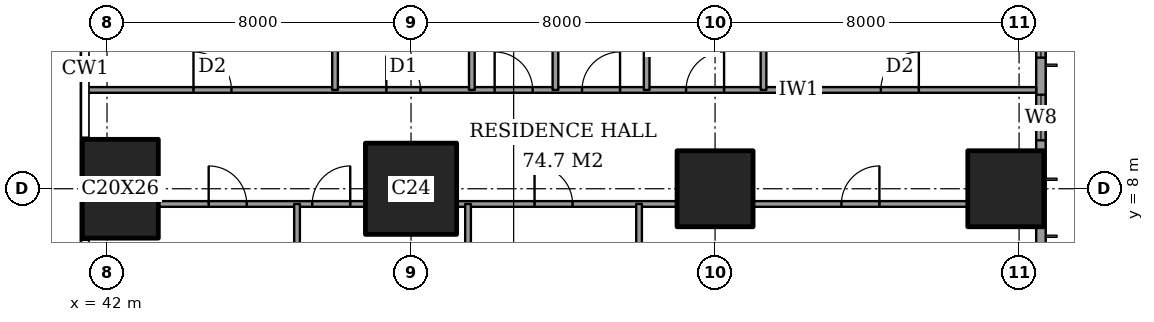
"""IFC4 building model, lengths in metres.
Left out: names, types, materials, properties, quantities, classifications, styles, units other than length and angle.
Written with IfcOpenShell. Run it as: python <this file> out.ifc"""

import sys

from ifc_helpers import new_model, si_unit, direction, frame, frame_2d, origin, origin_2d, place, context, subcontext, project, spatial, rectangle, extrude, element, fill, save


model = new_model("IFC4")
c1 = context("Model", 3, precision=1e-05, world=origin(), true_north=direction((0.0, 1.0)))
c2 = subcontext(c1, "Body", "Model", "MODEL_VIEW")
j1 = project(units=[si_unit("LENGTHUNIT", "METRE"), si_unit("PLANEANGLEUNIT", "RADIAN")], contexts=[c1])
p1 = place(None, origin())
s1 = spatial("IfcSite", under=j1, at=p1, CompositionType="ELEMENT")
p2 = place(p1, origin())
s2 = spatial("IfcBuilding", under=s1, at=p2, CompositionType="ELEMENT")
p3 = place(p2, frame((0.0, 0.0, 36.8)))
s3 = spatial("IfcBuildingStorey", under=s2, at=p3, CompositionType="ELEMENT", Elevation=36.8)
p4 = place(p3, frame((42.35, 8.0, 0.0), z_axis=(0.0, 0.0, 1.0), x_axis=(1.0, 0.0, 0.0)))
e1 = element("IfcColumn", 1, at=p4, inside=s3, PredefinedType="COLUMN", context=c2, shape_type="SweptSolid", body=[
    extrude(rectangle(XDim=2.0, YDim=2.6, at=origin_2d()), origin(), (0.0, 0.0, 1.0), 3.6),
])
p5 = place(p3, frame((50.0, 8.0, 0.0), z_axis=(0.0, 0.0, 1.0), x_axis=(1.0, 0.0, 0.0)))
e2 = element("IfcColumn", 2, at=p5, inside=s3, PredefinedType="COLUMN", context=c2, shape_type="SweptSolid", body=[
    extrude(rectangle(XDim=2.4, YDim=2.4, at=origin_2d()), origin(), (0.0, 0.0, 1.0), 3.6),
])
for number, where, z_axis, x_axis in (
    (3, (58.0, 8.0, 0.0), (0.0, 0.0, 1.0), (1.0, 0.0, 0.0)),
    (4, (65.65, 8.0, 0.0), (0.0, 0.0, 1.0), (1.0, 0.0, 0.0)),
):
    element("IfcColumn", number, at=place(p3, frame(where, z_axis=z_axis, x_axis=x_axis)), inside=s3, PredefinedType="COLUMN", context=c2, shape_type="SweptSolid", body=[
        extrude(rectangle(XDim=2.0, YDim=2.0, at=origin_2d()), origin(), (0.0, 0.0, 1.0), 3.6),
    ])
p6 = place(p3, frame((66.575, 3.175, 0.0), z_axis=(0.0, 0.0, 1.0), x_axis=(0.0, 1.0, 0.0)))
e5 = element("IfcWall", 5, at=p6, inside=s3, PredefinedType="SOLIDWALL", context=c2, shape_type="SweptSolid", body=[
    extrude(rectangle(XDim=41.65, YDim=0.25, at=frame_2d((20.825, 0.0))), origin(), (0.0, 0.0, 1.0), 3.6),
])
p7 = place(p6, frame((0.775, 0.0, 0.6)))
e6 = element("IfcOpeningElement", 6, at=p7, cuts=e5, PredefinedType="OPENING", context=c2, shape_type="SweptSolid", body=[
    extrude(rectangle(XDim=2.4, YDim=2.0, at=frame_2d((1.2, 1.0))), frame((0.0, 0.135, 0.0), z_axis=(0.0, -1.0, 0.0), x_axis=(1.0, 0.0, 0.0)), (0.0, 0.0, 1.0), 0.27),
])
p8 = place(p6, frame((6.1, 0.0, 0.6)))
e7 = element("IfcOpeningElement", 7, at=p8, cuts=e5, PredefinedType="OPENING", context=c2, shape_type="SweptSolid", body=[
    extrude(rectangle(XDim=1.2, YDim=2.0, at=frame_2d((0.6, 1.0))), frame((0.0, 0.135, 0.0), z_axis=(0.0, -1.0, 0.0), x_axis=(1.0, 0.0, 0.0)), (0.0, 0.0, 1.0), 0.27),
])
p9 = place(p6, frame((8.275, 0.0, 0.6)))
e8 = element("IfcOpeningElement", 8, at=p9, cuts=e5, PredefinedType="OPENING", context=c2, shape_type="SweptSolid", body=[
    extrude(rectangle(XDim=2.4, YDim=2.0, at=frame_2d((1.2, 1.0))), frame((0.0, 0.135, 0.0), z_axis=(0.0, -1.0, 0.0), x_axis=(1.0, 0.0, 0.0)), (0.0, 0.0, 1.0), 0.27),
])
p10 = place(p6, frame((15.775, 0.0, 0.6)))
e9 = element("IfcOpeningElement", 9, at=p10, cuts=e5, PredefinedType="OPENING", context=c2, shape_type="SweptSolid", body=[
    extrude(rectangle(XDim=2.4, YDim=2.0, at=frame_2d((1.2, 1.0))), frame((0.0, 0.135, 0.0), z_axis=(0.0, -1.0, 0.0), x_axis=(1.0, 0.0, 0.0)), (0.0, 0.0, 1.0), 0.27),
])
p11 = place(p6, frame((23.475, 0.0, 0.6)))
e10 = element("IfcOpeningElement", 10, at=p11, cuts=e5, PredefinedType="OPENING", context=c2, shape_type="SweptSolid", body=[
    extrude(rectangle(XDim=2.4, YDim=2.0, at=frame_2d((1.2, 1.0))), frame((0.0, 0.135, 0.0), z_axis=(0.0, -1.0, 0.0), x_axis=(1.0, 0.0, 0.0)), (0.0, 0.0, 1.0), 0.27),
])
p12 = place(p6, frame((30.975, 0.0, 0.6)))
e11 = element("IfcOpeningElement", 11, at=p12, cuts=e5, PredefinedType="OPENING", context=c2, shape_type="SweptSolid", body=[
    extrude(rectangle(XDim=2.4, YDim=2.0, at=frame_2d((1.2, 1.0))), frame((0.0, 0.135, 0.0), z_axis=(0.0, -1.0, 0.0), x_axis=(1.0, 0.0, 0.0)), (0.0, 0.0, 1.0), 0.27),
])
p13 = place(p6, frame((34.5, 0.0, 0.6)))
e12 = element("IfcOpeningElement", 12, at=p13, cuts=e5, PredefinedType="OPENING", context=c2, shape_type="SweptSolid", body=[
    extrude(rectangle(XDim=1.2, YDim=2.0, at=frame_2d((0.6, 1.0))), frame((0.0, 0.135, 0.0), z_axis=(0.0, -1.0, 0.0), x_axis=(1.0, 0.0, 0.0)), (0.0, 0.0, 1.0), 0.27),
])
p14 = place(p6, frame((38.475, 0.0, 0.6)))
e13 = element("IfcOpeningElement", 13, at=p14, cuts=e5, PredefinedType="OPENING", context=c2, shape_type="SweptSolid", body=[
    extrude(rectangle(XDim=2.4, YDim=2.0, at=frame_2d((1.2, 1.0))), frame((0.0, 0.135, 0.0), z_axis=(0.0, -1.0, 0.0), x_axis=(1.0, 0.0, 0.0)), (0.0, 0.0, 1.0), 0.27),
])
p15 = place(p3, frame((43.35, 7.6, 0.0), z_axis=(0.0, 0.0, 1.0), x_axis=(1.0, 0.0, 0.0)))
e14 = element("IfcWall", 14, at=p15, inside=s3, PredefinedType="PARTITIONING", context=c2, shape_type="SweptSolid", body=[
    extrude(rectangle(XDim=5.45, YDim=0.15, at=frame_2d((2.725, 0.0))), origin(), (0.0, 0.0, 1.0), 3.35),
])
p16 = place(p15, frame((4.05, 0.0, 0.0)))
e15 = element("IfcOpeningElement", 15, at=p16, cuts=e14, PredefinedType="OPENING", context=c2, shape_type="SweptSolid", body=[
    extrude(rectangle(XDim=1.0, YDim=2.1, at=frame_2d((0.5, 1.05))), frame((0.0, 0.085, 0.0), z_axis=(0.0, -1.0, 0.0), x_axis=(1.0, 0.0, 0.0)), (0.0, 0.0, 1.0), 0.17),
])
p17 = place(p15, frame((1.325, 0.0, 0.0)))
e16 = element("IfcOpeningElement", 16, at=p17, cuts=e14, PredefinedType="OPENING", context=c2, shape_type="SweptSolid", body=[
    extrude(rectangle(XDim=1.0, YDim=2.1, at=frame_2d((0.5, 1.05))), frame((0.0, 0.085, 0.0), z_axis=(0.0, -1.0, 0.0), x_axis=(1.0, 0.0, 0.0)), (0.0, 0.0, 1.0), 0.17),
])
p18 = place(p3, frame((51.2, 7.6, 0.0), z_axis=(0.0, 0.0, 1.0), x_axis=(1.0, 0.0, 0.0)))
e17 = element("IfcWall", 17, at=p18, inside=s3, PredefinedType="PARTITIONING", context=c2, shape_type="SweptSolid", body=[
    extrude(rectangle(XDim=5.8, YDim=0.15, at=frame_2d((2.9, 0.0))), origin(), (0.0, 0.0, 1.0), 3.35),
])
p19 = place(p18, frame((2.05, 0.0, 0.0)))
e18 = element("IfcOpeningElement", 18, at=p19, cuts=e17, PredefinedType="OPENING", context=c2, shape_type="SweptSolid", body=[
    extrude(rectangle(XDim=1.0, YDim=2.1, at=frame_2d((0.5, 1.05))), frame((0.0, 0.085, 0.0), z_axis=(0.0, -1.0, 0.0), x_axis=(1.0, 0.0, 0.0)), (0.0, 0.0, 1.0), 0.17),
])
p20 = place(p3, frame((59.0, 7.6, 0.0), z_axis=(0.0, 0.0, 1.0), x_axis=(1.0, 0.0, 0.0)))
e19 = element("IfcWall", 19, at=p20, inside=s3, PredefinedType="PARTITIONING", context=c2, shape_type="SweptSolid", body=[
    extrude(rectangle(XDim=5.65, YDim=0.15, at=frame_2d((2.825, 0.0))), origin(), (0.0, 0.0, 1.0), 3.35),
])
p21 = place(p20, frame((2.325, 0.0, 0.0)))
e20 = element("IfcOpeningElement", 20, at=p21, cuts=e19, PredefinedType="OPENING", context=c2, shape_type="SweptSolid", body=[
    extrude(rectangle(XDim=1.0, YDim=2.1, at=frame_2d((0.5, 1.05))), frame((0.0, 0.085, 0.0), z_axis=(0.0, -1.0, 0.0), x_axis=(1.0, 0.0, 0.0)), (0.0, 0.0, 1.0), 0.17),
])
p22 = place(p3, frame((41.439, 10.6, 0.0), z_axis=(0.0, 0.0, 1.0), x_axis=(1.0, 0.0, 0.0)))
e21 = element("IfcWall", 21, at=p22, inside=s3, PredefinedType="PARTITIONING", context=c2, shape_type="SweptSolid", body=[
    extrude(rectangle(XDim=25.011, YDim=0.15, at=frame_2d((12.505, 0.0))), origin(), (0.0, 0.0, 1.0), 3.35),
])
p23 = place(p22, frame((10.761, 0.0, 0.0)))
e22 = element("IfcOpeningElement", 22, at=p23, cuts=e21, PredefinedType="OPENING", context=c2, shape_type="SweptSolid", body=[
    extrude(rectangle(XDim=1.0, YDim=2.1, at=frame_2d((0.5, 1.05))), frame((0.0, 0.085, 0.0), z_axis=(0.0, -1.0, 0.0), x_axis=(1.0, 0.0, 0.0)), (0.0, 0.0, 1.0), 0.17),
])
p24 = place(p22, frame((20.924, 0.0, 0.0)))
e23 = element("IfcOpeningElement", 23, at=p24, cuts=e21, PredefinedType="OPENING", context=c2, shape_type="SweptSolid", body=[
    extrude(rectangle(XDim=1.0, YDim=2.1, at=frame_2d((0.5, 1.05))), frame((0.0, 0.085, 0.0), z_axis=(0.0, -1.0, 0.0), x_axis=(1.0, 0.0, 0.0)), (0.0, 0.0, 1.0), 0.17),
])
p25 = place(p22, frame((15.799, 0.0, 0.0)))
e24 = element("IfcOpeningElement", 24, at=p25, cuts=e21, PredefinedType="OPENING", context=c2, shape_type="SweptSolid", body=[
    extrude(rectangle(XDim=1.0, YDim=2.1, at=frame_2d((0.5, 1.05))), frame((0.0, 0.085, 0.0), z_axis=(0.0, -1.0, 0.0), x_axis=(1.0, 0.0, 0.0)), (0.0, 0.0, 1.0), 0.17),
])
p26 = place(p22, frame((13.061, 0.0, 0.0)))
e25 = element("IfcOpeningElement", 25, at=p26, cuts=e21, PredefinedType="OPENING", context=c2, shape_type="SweptSolid", body=[
    extrude(rectangle(XDim=1.0, YDim=2.1, at=frame_2d((0.5, 1.05))), frame((0.0, 0.085, 0.0), z_axis=(0.0, -1.0, 0.0), x_axis=(1.0, 0.0, 0.0)), (0.0, 0.0, 1.0), 0.17),
])
p27 = place(p22, frame((7.911, 0.0, 0.0)))
e26 = element("IfcOpeningElement", 26, at=p27, cuts=e21, PredefinedType="OPENING", context=c2, shape_type="SweptSolid", body=[
    extrude(rectangle(XDim=0.9, YDim=2.1, at=frame_2d((0.45, 1.05))), frame((0.0, 0.085, 0.0), z_axis=(0.0, -1.0, 0.0), x_axis=(1.0, 0.0, 0.0)), (0.0, 0.0, 1.0), 0.17),
])
p28 = place(p22, frame((2.836, 0.0, 0.0)))
e27 = element("IfcOpeningElement", 27, at=p28, cuts=e21, PredefinedType="OPENING", context=c2, shape_type="SweptSolid", body=[
    extrude(rectangle(XDim=1.0, YDim=2.1, at=frame_2d((0.5, 1.05))), frame((0.0, 0.085, 0.0), z_axis=(0.0, -1.0, 0.0), x_axis=(1.0, 0.0, 0.0)), (0.0, 0.0, 1.0), 0.17),
])
p29 = place(p3, frame((47.0, -0.45, 0.0), z_axis=(0.0, 0.0, 1.0), x_axis=(0.0, 1.0, 0.0)))
e28 = element("IfcWall", 28, at=p29, inside=s3, PredefinedType="PARTITIONING", context=c2, shape_type="SweptSolid", body=[
    extrude(rectangle(XDim=8.05, YDim=0.15, at=frame_2d((4.025, 0.0))), origin(), (0.0, 0.0, 1.0), 3.35),
])
p30 = place(p3, frame((48.0, 10.6, 0.0), z_axis=(0.0, 0.0, 1.0), x_axis=(0.0, 1.0, 0.0)))
e29 = element("IfcWall", 29, at=p30, inside=s3, PredefinedType="PARTITIONING", context=c2, shape_type="SweptSolid", body=[
    extrude(rectangle(XDim=13.4, YDim=0.15, at=frame_2d((6.7, 0.0))), origin(), (0.0, 0.0, 1.0), 3.35),
])
p31 = place(p30, frame((10.8, 0.0, 0.0)))
e30 = element("IfcOpeningElement", 30, at=p31, cuts=e29, PredefinedType="OPENING", context=c2, shape_type="SweptSolid", body=[
    extrude(rectangle(XDim=1.2, YDim=2.4, at=frame_2d((0.6, 1.2))), frame((0.0, 0.085, 0.0), z_axis=(0.0, -1.0, 0.0), x_axis=(1.0, 0.0, 0.0)), (0.0, 0.0, 1.0), 0.17),
])
p32 = place(p30, frame((6.7, 0.0, 0.0)))
e31 = element("IfcOpeningElement", 31, at=p32, cuts=e29, PredefinedType="OPENING", context=c2, shape_type="SweptSolid", body=[
    extrude(rectangle(XDim=0.9, YDim=2.1, at=frame_2d((0.45, 1.05))), frame((0.0, 0.085, 0.0), z_axis=(0.0, -1.0, 0.0), x_axis=(1.0, 0.0, 0.0)), (0.0, 0.0, 1.0), 0.17),
])
p33 = place(p3, frame((51.5, -0.45, 0.0), z_axis=(0.0, 0.0, 1.0), x_axis=(0.0, 1.0, 0.0)))
e32 = element("IfcWall", 32, at=p33, inside=s3, PredefinedType="PARTITIONING", context=c2, shape_type="SweptSolid", body=[
    extrude(rectangle(XDim=8.05, YDim=0.15, at=frame_2d((4.025, 0.0))), origin(), (0.0, 0.0, 1.0), 3.35),
])
for number, where, z_axis, x_axis in (
    (33, (51.6, 10.6, 0.0), (0.0, 0.0, 1.0), (0.0, 1.0, 0.0)),
    (34, (53.8, 10.6, 0.0), (0.0, 0.0, 1.0), (0.0, 1.0, 0.0)),
):
    element("IfcWall", number, at=place(p3, frame(where, z_axis=z_axis, x_axis=x_axis)), inside=s3, PredefinedType="PARTITIONING", context=c2, shape_type="SweptSolid", body=[
        extrude(rectangle(XDim=4.0, YDim=0.15, at=frame_2d((2.0, 0.0))), origin(), (0.0, 0.0, 1.0), 3.35),
    ])
p34 = place(p3, frame((56.0, -0.45, 0.0), z_axis=(0.0, 0.0, 1.0), x_axis=(0.0, 1.0, 0.0)))
e35 = element("IfcWall", 35, at=p34, inside=s3, PredefinedType="PARTITIONING", context=c2, shape_type="SweptSolid", body=[
    extrude(rectangle(XDim=8.05, YDim=0.15, at=frame_2d((4.025, 0.0))), origin(), (0.0, 0.0, 1.0), 3.35),
])
p35 = place(p3, frame((56.2, 10.6, 0.0), z_axis=(0.0, 0.0, 1.0), x_axis=(0.0, 1.0, 0.0)))
e36 = element("IfcWall", 36, at=p35, inside=s3, PredefinedType="PARTITIONING", context=c2, shape_type="SweptSolid", body=[
    extrude(rectangle(XDim=11.0, YDim=0.15, at=frame_2d((5.5, 0.0))), origin(), (0.0, 0.0, 1.0), 3.35),
])
p36 = place(p35, frame((7.0, 0.0, 0.0)))
e37 = element("IfcOpeningElement", 37, at=p36, cuts=e36, PredefinedType="OPENING", context=c2, shape_type="SweptSolid", body=[
    extrude(rectangle(XDim=1.0, YDim=2.1, at=frame_2d((0.5, 1.05))), frame((0.0, 0.085, 0.0), z_axis=(0.0, -1.0, 0.0), x_axis=(1.0, 0.0, 0.0)), (0.0, 0.0, 1.0), 0.17),
])
p37 = place(p3, frame((59.275, 10.6, 0.0), z_axis=(0.0, 0.0, 1.0), x_axis=(0.0, 1.0, 0.0)))
e38 = element("IfcWall", 38, at=p37, inside=s3, PredefinedType="PARTITIONING", context=c2, shape_type="SweptSolid", body=[
    extrude(rectangle(XDim=4.2, YDim=0.15, at=frame_2d((2.1, 0.0))), origin(), (0.0, 0.0, 1.0), 3.35),
])
p38 = place(p8, origin())
e39 = element("IfcWindow", 39, at=p38, inside=s3, PartitioningType="SINGLE_PANEL", PredefinedType="WINDOW", context=c2, shape_type="SweptSolid", body=[
    extrude(rectangle(XDim=1.2, YDim=2.0, at=frame_2d((0.6, 1.0))), frame((0.0, 0.03, 0.0), z_axis=(0.0, -1.0, 0.0), x_axis=(1.0, 0.0, 0.0)), (0.0, 0.0, 1.0), 0.06),
])
fill(e7, e39)
p39 = place(p9, origin())
e40 = element("IfcWindow", 40, at=p39, inside=s3, PartitioningType="SINGLE_PANEL", PredefinedType="WINDOW", context=c2, shape_type="SweptSolid", body=[
    extrude(rectangle(XDim=2.4, YDim=2.0, at=frame_2d((1.2, 1.0))), frame((0.0, 0.03, 0.0), z_axis=(0.0, -1.0, 0.0), x_axis=(1.0, 0.0, 0.0)), (0.0, 0.0, 1.0), 0.06),
])
fill(e8, e40)
p40 = place(p21, origin())
e41 = element("IfcDoor", 41, at=p40, inside=s3, OperationType="SINGLE_SWING_LEFT", PredefinedType="DOOR", context=c2, shape_type="SweptSolid", body=[
    extrude(rectangle(XDim=1.0, YDim=2.1, at=frame_2d((0.5, 1.05))), frame((0.0, 0.025, 0.0), z_axis=(0.0, -1.0, 0.0), x_axis=(1.0, 0.0, 0.0)), (0.0, 0.0, 1.0), 0.05),
])
fill(e20, e41)
p41 = place(p19, origin())
e42 = element("IfcDoor", 42, at=p41, inside=s3, OperationType="SINGLE_SWING_RIGHT", PredefinedType="DOOR", context=c2, shape_type="SweptSolid", body=[
    extrude(rectangle(XDim=1.0, YDim=2.1, at=frame_2d((0.5, 1.05))), frame((0.0, 0.025, 0.0), z_axis=(0.0, -1.0, 0.0), x_axis=(1.0, 0.0, 0.0)), (0.0, 0.0, 1.0), 0.05),
])
fill(e18, e42)
p42 = place(p16, origin())
e43 = element("IfcDoor", 43, at=p42, inside=s3, OperationType="SINGLE_SWING_LEFT", PredefinedType="DOOR", context=c2, shape_type="SweptSolid", body=[
    extrude(rectangle(XDim=1.0, YDim=2.1, at=frame_2d((0.5, 1.05))), frame((0.0, 0.025, 0.0), z_axis=(0.0, -1.0, 0.0), x_axis=(1.0, 0.0, 0.0)), (0.0, 0.0, 1.0), 0.05),
])
fill(e15, e43)
p43 = place(p17, origin())
e44 = element("IfcDoor", 44, at=p43, inside=s3, OperationType="SINGLE_SWING_RIGHT", PredefinedType="DOOR", context=c2, shape_type="SweptSolid", body=[
    extrude(rectangle(XDim=1.0, YDim=2.1, at=frame_2d((0.5, 1.05))), frame((0.0, 0.025, 0.0), z_axis=(0.0, -1.0, 0.0), x_axis=(1.0, 0.0, 0.0)), (0.0, 0.0, 1.0), 0.05),
])
fill(e16, e44)
p44 = place(p23, origin())
e45 = element("IfcDoor", 45, at=p44, inside=s3, OperationType="SINGLE_SWING_RIGHT", PredefinedType="DOOR", context=c2, shape_type="SweptSolid", body=[
    extrude(rectangle(XDim=1.0, YDim=2.1, at=frame_2d((0.5, 1.05))), frame((0.0, 0.025, 0.0), z_axis=(0.0, -1.0, 0.0), x_axis=(1.0, 0.0, 0.0)), (0.0, 0.0, 1.0), 0.05),
])
fill(e22, e45)
p45 = place(p24, origin())
e46 = element("IfcDoor", 46, at=p45, inside=s3, OperationType="SINGLE_SWING_LEFT", PredefinedType="DOOR", context=c2, shape_type="SweptSolid", body=[
    extrude(rectangle(XDim=1.0, YDim=2.1, at=frame_2d((0.5, 1.05))), frame((0.0, 0.025, 0.0), z_axis=(0.0, -1.0, 0.0), x_axis=(1.0, 0.0, 0.0)), (0.0, 0.0, 1.0), 0.05),
])
fill(e23, e46)
p46 = place(p25, origin())
e47 = element("IfcDoor", 47, at=p46, inside=s3, OperationType="SINGLE_SWING_LEFT", PredefinedType="DOOR", context=c2, shape_type="SweptSolid", body=[
    extrude(rectangle(XDim=1.0, YDim=2.1, at=frame_2d((0.5, 1.05))), frame((0.0, 0.025, 0.0), z_axis=(0.0, -1.0, 0.0), x_axis=(1.0, 0.0, 0.0)), (0.0, 0.0, 1.0), 0.05),
])
fill(e24, e47)
p47 = place(p26, origin())
e48 = element("IfcDoor", 48, at=p47, inside=s3, OperationType="SINGLE_SWING_LEFT", PredefinedType="DOOR", context=c2, shape_type="SweptSolid", body=[
    extrude(rectangle(XDim=1.0, YDim=2.1, at=frame_2d((0.5, 1.05))), frame((0.0, 0.025, 0.0), z_axis=(0.0, -1.0, 0.0), x_axis=(1.0, 0.0, 0.0)), (0.0, 0.0, 1.0), 0.05),
])
fill(e25, e48)
p48 = place(p27, origin())
e49 = element("IfcDoor", 49, at=p48, inside=s3, OperationType="SINGLE_SWING_RIGHT", PredefinedType="DOOR", context=c2, shape_type="SweptSolid", body=[
    extrude(rectangle(XDim=0.9, YDim=2.1, at=frame_2d((0.45, 1.05))), frame((0.0, 0.025, 0.0), z_axis=(0.0, -1.0, 0.0), x_axis=(1.0, 0.0, 0.0)), (0.0, 0.0, 1.0), 0.05),
])
fill(e26, e49)
p49 = place(p28, origin())
e50 = element("IfcDoor", 50, at=p49, inside=s3, OperationType="SINGLE_SWING_RIGHT", PredefinedType="DOOR", context=c2, shape_type="SweptSolid", body=[
    extrude(rectangle(XDim=1.0, YDim=2.1, at=frame_2d((0.5, 1.05))), frame((0.0, 0.025, 0.0), z_axis=(0.0, -1.0, 0.0), x_axis=(1.0, 0.0, 0.0)), (0.0, 0.0, 1.0), 0.05),
])
fill(e27, e50)
save(model, sys.argv[1])
